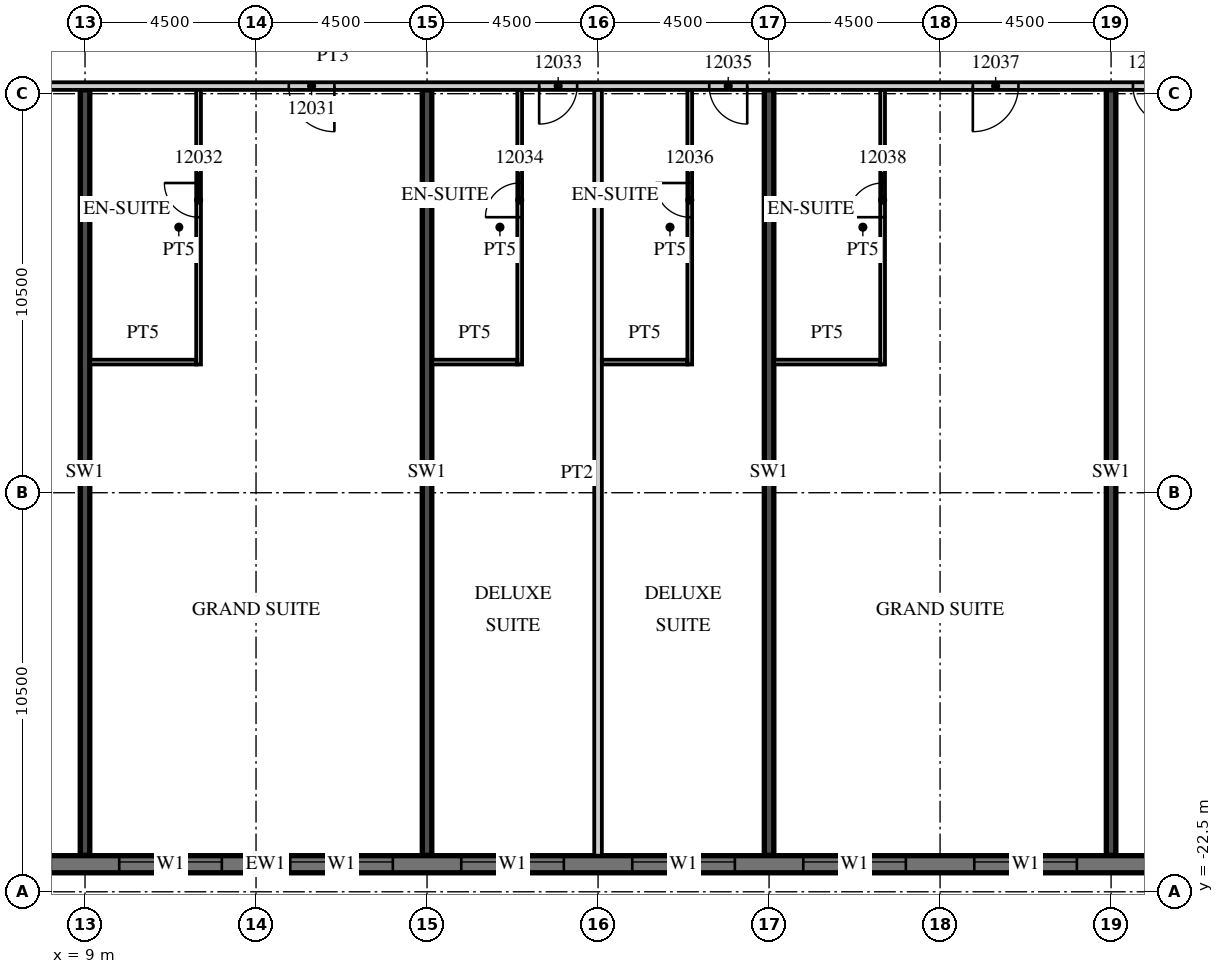
"""IFC4 building model, lengths in metres.
Left out: names, types, materials, properties, quantities, classifications, styles, units other than length and angle.
Written with IfcOpenShell. Run it as: python <this file> out.ifc"""

import sys

from ifc_helpers import new_model, si_unit, direction, frame, frame_2d, origin, place, context, subcontext, project, spatial, rectangle, extrude, element, fill, save


model = new_model("IFC4")
c1 = context("Model", 3, precision=1e-05, world=origin(), true_north=direction((0.0, 1.0)))
c2 = subcontext(c1, "Body", "Model", "MODEL_VIEW")
j1 = project(units=[si_unit("LENGTHUNIT", "METRE"), si_unit("PLANEANGLEUNIT", "RADIAN")], contexts=[c1])
p1 = place(None, origin())
s1 = spatial("IfcSite", under=j1, at=p1, CompositionType="ELEMENT")
p2 = place(p1, origin())
s2 = spatial("IfcBuilding", under=s1, at=p2, CompositionType="ELEMENT")
p3 = place(p2, frame((0.0, 0.0, 69.9)))
s3 = spatial("IfcBuildingStorey", under=s2, at=p3, CompositionType="ELEMENT", Elevation=69.9)
for number, where, z_axis, x_axis in (
    (1, (9.0, -21.54, 0.0), (0.0, 0.0, 1.0), (0.0, 1.0, 0.0)),
    (2, (18.0, -21.54, 0.0), (0.0, 0.0, 1.0), (0.0, 1.0, 0.0)),
    (3, (27.0, -21.54, 0.0), (0.0, 0.0, 1.0), (0.0, 1.0, 0.0)),
    (4, (36.0, -21.54, 0.0), (0.0, 0.0, 1.0), (0.0, 1.0, 0.0)),
):
    element("IfcWall", number, at=place(p3, frame(where, z_axis=z_axis, x_axis=x_axis)), inside=s3, PredefinedType="SHEAR", context=c2, shape_type="SweptSolid", body=[
        extrude(rectangle(XDim=20.14, YDim=0.25, at=frame_2d((10.07, 0.0))), origin(), (0.0, 0.0, 1.0), 3.3),
    ])
p4 = place(p3, frame((-13.5, -21.775, 0.0), z_axis=(0.0, 0.0, 1.0), x_axis=(1.0, 0.0, 0.0)))
e5 = element("IfcWall", 5, at=p4, inside=s3, PredefinedType="SOLIDWALL", context=c2, shape_type="SweptSolid", body=[
    extrude(rectangle(XDim=54.5, YDim=0.45, at=frame_2d((27.25, 0.0))), origin(), (0.0, 0.0, 1.0), 3.02),
])
p5 = place(p4, frame((0.9, 0.0, 0.45)))
e6 = element("IfcOpeningElement", 6, at=p5, cuts=e5, PredefinedType="OPENING", context=c2, shape_type="SweptSolid", body=[
    extrude(rectangle(XDim=2.7, YDim=2.25, at=frame_2d((1.35, 1.125))), frame((0.0, 0.235, 0.0), z_axis=(0.0, -1.0, 0.0), x_axis=(1.0, 0.0, 0.0)), (0.0, 0.0, 1.0), 0.47),
])
p6 = place(p4, frame((5.4, 0.0, 0.45)))
e7 = element("IfcOpeningElement", 7, at=p6, cuts=e5, PredefinedType="OPENING", context=c2, shape_type="SweptSolid", body=[
    extrude(rectangle(XDim=2.7, YDim=2.25, at=frame_2d((1.35, 1.125))), frame((0.0, 0.235, 0.0), z_axis=(0.0, -1.0, 0.0), x_axis=(1.0, 0.0, 0.0)), (0.0, 0.0, 1.0), 0.47),
])
p7 = place(p4, frame((9.9, 0.0, 0.45)))
e8 = element("IfcOpeningElement", 8, at=p7, cuts=e5, PredefinedType="OPENING", context=c2, shape_type="SweptSolid", body=[
    extrude(rectangle(XDim=2.7, YDim=2.25, at=frame_2d((1.35, 1.125))), frame((0.0, 0.235, 0.0), z_axis=(0.0, -1.0, 0.0), x_axis=(1.0, 0.0, 0.0)), (0.0, 0.0, 1.0), 0.47),
])
p8 = place(p4, frame((14.4, 0.0, 0.45)))
e9 = element("IfcOpeningElement", 9, at=p8, cuts=e5, PredefinedType="OPENING", context=c2, shape_type="SweptSolid", body=[
    extrude(rectangle(XDim=2.7, YDim=2.25, at=frame_2d((1.35, 1.125))), frame((0.0, 0.235, 0.0), z_axis=(0.0, -1.0, 0.0), x_axis=(1.0, 0.0, 0.0)), (0.0, 0.0, 1.0), 0.47),
])
p9 = place(p4, frame((18.9, 0.0, 0.45)))
e10 = element("IfcOpeningElement", 10, at=p9, cuts=e5, PredefinedType="OPENING", context=c2, shape_type="SweptSolid", body=[
    extrude(rectangle(XDim=2.7, YDim=2.25, at=frame_2d((1.35, 1.125))), frame((0.0, 0.235, 0.0), z_axis=(0.0, -1.0, 0.0), x_axis=(1.0, 0.0, 0.0)), (0.0, 0.0, 1.0), 0.47),
])
p10 = place(p4, frame((23.4, 0.0, 0.45)))
e11 = element("IfcOpeningElement", 11, at=p10, cuts=e5, PredefinedType="OPENING", context=c2, shape_type="SweptSolid", body=[
    extrude(rectangle(XDim=2.7, YDim=2.25, at=frame_2d((1.35, 1.125))), frame((0.0, 0.235, 0.0), z_axis=(0.0, -1.0, 0.0), x_axis=(1.0, 0.0, 0.0)), (0.0, 0.0, 1.0), 0.47),
])
p11 = place(p4, frame((27.9, 0.0, 0.45)))
e12 = element("IfcOpeningElement", 12, at=p11, cuts=e5, PredefinedType="OPENING", context=c2, shape_type="SweptSolid", body=[
    extrude(rectangle(XDim=2.7, YDim=2.25, at=frame_2d((1.35, 1.125))), frame((0.0, 0.235, 0.0), z_axis=(0.0, -1.0, 0.0), x_axis=(1.0, 0.0, 0.0)), (0.0, 0.0, 1.0), 0.47),
])
p12 = place(p4, frame((32.4, 0.0, 0.45)))
e13 = element("IfcOpeningElement", 13, at=p12, cuts=e5, PredefinedType="OPENING", context=c2, shape_type="SweptSolid", body=[
    extrude(rectangle(XDim=2.7, YDim=2.25, at=frame_2d((1.35, 1.125))), frame((0.0, 0.235, 0.0), z_axis=(0.0, -1.0, 0.0), x_axis=(1.0, 0.0, 0.0)), (0.0, 0.0, 1.0), 0.47),
])
p13 = place(p4, frame((36.9, 0.0, 0.45)))
e14 = element("IfcOpeningElement", 14, at=p13, cuts=e5, PredefinedType="OPENING", context=c2, shape_type="SweptSolid", body=[
    extrude(rectangle(XDim=2.7, YDim=2.25, at=frame_2d((1.35, 1.125))), frame((0.0, 0.235, 0.0), z_axis=(0.0, -1.0, 0.0), x_axis=(1.0, 0.0, 0.0)), (0.0, 0.0, 1.0), 0.47),
])
p14 = place(p4, frame((41.4, 0.0, 0.45)))
e15 = element("IfcOpeningElement", 15, at=p14, cuts=e5, PredefinedType="OPENING", context=c2, shape_type="SweptSolid", body=[
    extrude(rectangle(XDim=2.7, YDim=2.25, at=frame_2d((1.35, 1.125))), frame((0.0, 0.235, 0.0), z_axis=(0.0, -1.0, 0.0), x_axis=(1.0, 0.0, 0.0)), (0.0, 0.0, 1.0), 0.47),
])
p15 = place(p4, frame((45.9, 0.0, 0.45)))
e16 = element("IfcOpeningElement", 16, at=p15, cuts=e5, PredefinedType="OPENING", context=c2, shape_type="SweptSolid", body=[
    extrude(rectangle(XDim=2.7, YDim=2.25, at=frame_2d((1.35, 1.125))), frame((0.0, 0.235, 0.0), z_axis=(0.0, -1.0, 0.0), x_axis=(1.0, 0.0, 0.0)), (0.0, 0.0, 1.0), 0.47),
])
p16 = place(p4, frame((50.4, 0.0, 0.45)))
e17 = element("IfcOpeningElement", 17, at=p16, cuts=e5, PredefinedType="OPENING", context=c2, shape_type="SweptSolid", body=[
    extrude(rectangle(XDim=2.7, YDim=2.25, at=frame_2d((1.35, 1.125))), frame((0.0, 0.235, 0.0), z_axis=(0.0, -1.0, 0.0), x_axis=(1.0, 0.0, 0.0)), (0.0, 0.0, 1.0), 0.47),
])
p17 = place(p3, frame((-13.5, -1.3, 0.0), z_axis=(0.0, 0.0, 1.0), x_axis=(1.0, 0.0, 0.0)))
e18 = element("IfcWall", 18, at=p17, inside=s3, PredefinedType="PARTITIONING", context=c2, shape_type="SweptSolid", body=[
    extrude(rectangle(XDim=58.05, YDim=0.2, at=frame_2d((29.025, 0.0))), origin(), (0.0, 0.0, 1.0), 3.02),
])
p18 = place(p17, frame((2.925, 0.0, 0.0)))
e19 = element("IfcOpeningElement", 19, at=p18, cuts=e18, PredefinedType="OPENING", context=c2, shape_type="SweptSolid", body=[
    extrude(rectangle(XDim=1.0, YDim=2.1, at=frame_2d((0.5, 1.05))), frame((0.0, 0.11, 0.0), z_axis=(0.0, -1.0, 0.0), x_axis=(1.0, 0.0, 0.0)), (0.0, 0.0, 1.0), 0.22),
])
p19 = place(p17, frame((5.075, 0.0, 0.0)))
e20 = element("IfcOpeningElement", 20, at=p19, cuts=e18, PredefinedType="OPENING", context=c2, shape_type="SweptSolid", body=[
    extrude(rectangle(XDim=1.0, YDim=2.1, at=frame_2d((0.5, 1.05))), frame((0.0, 0.11, 0.0), z_axis=(0.0, -1.0, 0.0), x_axis=(1.0, 0.0, 0.0)), (0.0, 0.0, 1.0), 0.22),
])
p20 = place(p17, frame((9.55, 0.0, 0.0)))
e21 = element("IfcOpeningElement", 21, at=p20, cuts=e18, PredefinedType="OPENING", context=c2, shape_type="SweptSolid", body=[
    extrude(rectangle(XDim=1.0, YDim=2.1, at=frame_2d((0.5, 1.05))), frame((0.0, 0.11, 0.0), z_axis=(0.0, -1.0, 0.0), x_axis=(1.0, 0.0, 0.0)), (0.0, 0.0, 1.0), 0.22),
])
p21 = place(p17, frame((18.862, 0.0, 0.0)))
e22 = element("IfcOpeningElement", 22, at=p21, cuts=e18, PredefinedType="OPENING", context=c2, shape_type="SweptSolid", body=[
    extrude(rectangle(XDim=1.2, YDim=2.1, at=frame_2d((0.6, 1.05))), frame((0.0, 0.11, 0.0), z_axis=(0.0, -1.0, 0.0), x_axis=(1.0, 0.0, 0.0)), (0.0, 0.0, 1.0), 0.22),
])
p22 = place(p17, frame((27.862, 0.0, 0.0)))
e23 = element("IfcOpeningElement", 23, at=p22, cuts=e18, PredefinedType="OPENING", context=c2, shape_type="SweptSolid", body=[
    extrude(rectangle(XDim=1.2, YDim=2.1, at=frame_2d((0.6, 1.05))), frame((0.0, 0.11, 0.0), z_axis=(0.0, -1.0, 0.0), x_axis=(1.0, 0.0, 0.0)), (0.0, 0.0, 1.0), 0.22),
])
p23 = place(p17, frame((34.45, 0.0, 0.0)))
e24 = element("IfcOpeningElement", 24, at=p23, cuts=e18, PredefinedType="OPENING", context=c2, shape_type="SweptSolid", body=[
    extrude(rectangle(XDim=1.0, YDim=2.1, at=frame_2d((0.5, 1.05))), frame((0.0, 0.11, 0.0), z_axis=(0.0, -1.0, 0.0), x_axis=(1.0, 0.0, 0.0)), (0.0, 0.0, 1.0), 0.22),
])
p24 = place(p17, frame((38.925, 0.0, 0.0)))
e25 = element("IfcOpeningElement", 25, at=p24, cuts=e18, PredefinedType="OPENING", context=c2, shape_type="SweptSolid", body=[
    extrude(rectangle(XDim=1.0, YDim=2.1, at=frame_2d((0.5, 1.05))), frame((0.0, 0.11, 0.0), z_axis=(0.0, -1.0, 0.0), x_axis=(1.0, 0.0, 0.0)), (0.0, 0.0, 1.0), 0.22),
])
p25 = place(p17, frame((45.862, 0.0, 0.0)))
e26 = element("IfcOpeningElement", 26, at=p25, cuts=e18, PredefinedType="OPENING", context=c2, shape_type="SweptSolid", body=[
    extrude(rectangle(XDim=1.2, YDim=2.1, at=frame_2d((0.6, 1.05))), frame((0.0, 0.11, 0.0), z_axis=(0.0, -1.0, 0.0), x_axis=(1.0, 0.0, 0.0)), (0.0, 0.0, 1.0), 0.22),
])
p26 = place(p17, frame((50.075, 0.0, 0.0)))
e27 = element("IfcOpeningElement", 27, at=p26, cuts=e18, PredefinedType="OPENING", context=c2, shape_type="SweptSolid", body=[
    extrude(rectangle(XDim=1.0, YDim=2.1, at=frame_2d((0.5, 1.05))), frame((0.0, 0.11, 0.0), z_axis=(0.0, -1.0, 0.0), x_axis=(1.0, 0.0, 0.0)), (0.0, 0.0, 1.0), 0.22),
])
p27 = place(p17, frame((56.525, 0.0, 0.0)))
e28 = element("IfcOpeningElement", 28, at=p27, cuts=e18, PredefinedType="OPENING", context=c2, shape_type="SweptSolid", body=[
    extrude(rectangle(XDim=1.0, YDim=2.1, at=frame_2d((0.5, 1.05))), frame((0.0, 0.11, 0.0), z_axis=(0.0, -1.0, 0.0), x_axis=(1.0, 0.0, 0.0)), (0.0, 0.0, 1.0), 0.22),
])
p28 = place(p3, frame((11.988, -8.625, 0.0), z_axis=(0.0, 0.0, 1.0), x_axis=(0.0, 1.0, 0.0)))
e29 = element("IfcWall", 29, at=p28, inside=s3, PredefinedType="PARTITIONING", context=c2, shape_type="SweptSolid", body=[
    extrude(rectangle(XDim=7.225, YDim=0.125, at=frame_2d((3.613, 0.0))), origin(), (0.0, 0.0, 1.0), 3.02),
])
p29 = place(p28, frame((3.875, 0.0, 0.0)))
e30 = element("IfcOpeningElement", 30, at=p29, cuts=e29, PredefinedType="OPENING", context=c2, shape_type="SweptSolid", body=[
    extrude(rectangle(XDim=0.9, YDim=2.1, at=frame_2d((0.45, 1.05))), frame((0.0, 0.073, 0.0), z_axis=(0.0, -1.0, 0.0), x_axis=(1.0, 0.0, 0.0)), (0.0, 0.0, 1.0), 0.145),
])
p30 = place(p3, frame((9.125, -8.562, 0.0), z_axis=(0.0, 0.0, 1.0), x_axis=(1.0, 0.0, 0.0)))
e31 = element("IfcWall", 31, at=p30, inside=s3, PredefinedType="PARTITIONING", context=c2, shape_type="SweptSolid", body=[
    extrude(rectangle(XDim=2.8, YDim=0.125, at=frame_2d((1.4, 0.0))), origin(), (0.0, 0.0, 1.0), 3.02),
])
p31 = place(p3, frame((22.5, -21.55, 0.0), z_axis=(0.0, 0.0, 1.0), x_axis=(0.0, 1.0, 0.0)))
e32 = element("IfcWall", 32, at=p31, inside=s3, PredefinedType="PARTITIONING", context=c2, shape_type="SweptSolid", body=[
    extrude(rectangle(XDim=20.15, YDim=0.2, at=frame_2d((10.075, 0.0))), origin(), (0.0, 0.0, 1.0), 3.02),
])
p32 = place(p3, frame((20.438, -8.625, 0.0), z_axis=(0.0, 0.0, 1.0), x_axis=(0.0, 1.0, 0.0)))
e33 = element("IfcWall", 33, at=p32, inside=s3, PredefinedType="PARTITIONING", context=c2, shape_type="SweptSolid", body=[
    extrude(rectangle(XDim=7.225, YDim=0.125, at=frame_2d((3.613, 0.0))), origin(), (0.0, 0.0, 1.0), 3.02),
])
p33 = place(p32, frame((3.875, 0.0, 0.0)))
e34 = element("IfcOpeningElement", 34, at=p33, cuts=e33, PredefinedType="OPENING", context=c2, shape_type="SweptSolid", body=[
    extrude(rectangle(XDim=0.9, YDim=2.1, at=frame_2d((0.45, 1.05))), frame((0.0, 0.073, 0.0), z_axis=(0.0, -1.0, 0.0), x_axis=(1.0, 0.0, 0.0)), (0.0, 0.0, 1.0), 0.145),
])
p34 = place(p3, frame((18.125, -8.562, 0.0), z_axis=(0.0, 0.0, 1.0), x_axis=(1.0, 0.0, 0.0)))
e35 = element("IfcWall", 35, at=p34, inside=s3, PredefinedType="PARTITIONING", context=c2, shape_type="SweptSolid", body=[
    extrude(rectangle(XDim=2.25, YDim=0.125, at=frame_2d((1.125, 0.0))), origin(), (0.0, 0.0, 1.0), 3.02),
])
p35 = place(p3, frame((24.913, -8.625, 0.0), z_axis=(0.0, 0.0, 1.0), x_axis=(0.0, 1.0, 0.0)))
e36 = element("IfcWall", 36, at=p35, inside=s3, PredefinedType="PARTITIONING", context=c2, shape_type="SweptSolid", body=[
    extrude(rectangle(XDim=7.225, YDim=0.125, at=frame_2d((3.613, 0.0))), origin(), (0.0, 0.0, 1.0), 3.02),
])
p36 = place(p35, frame((3.875, 0.0, 0.0)))
e37 = element("IfcOpeningElement", 37, at=p36, cuts=e36, PredefinedType="OPENING", context=c2, shape_type="SweptSolid", body=[
    extrude(rectangle(XDim=0.9, YDim=2.1, at=frame_2d((0.45, 1.05))), frame((0.0, 0.073, 0.0), z_axis=(0.0, -1.0, 0.0), x_axis=(1.0, 0.0, 0.0)), (0.0, 0.0, 1.0), 0.145),
])
p37 = place(p3, frame((22.6, -8.562, 0.0), z_axis=(0.0, 0.0, 1.0), x_axis=(1.0, 0.0, 0.0)))
e38 = element("IfcWall", 38, at=p37, inside=s3, PredefinedType="PARTITIONING", context=c2, shape_type="SweptSolid", body=[
    extrude(rectangle(XDim=2.25, YDim=0.125, at=frame_2d((1.125, 0.0))), origin(), (0.0, 0.0, 1.0), 3.02),
])
p38 = place(p3, frame((29.988, -8.625, 0.0), z_axis=(0.0, 0.0, 1.0), x_axis=(0.0, 1.0, 0.0)))
e39 = element("IfcWall", 39, at=p38, inside=s3, PredefinedType="PARTITIONING", context=c2, shape_type="SweptSolid", body=[
    extrude(rectangle(XDim=7.225, YDim=0.125, at=frame_2d((3.613, 0.0))), origin(), (0.0, 0.0, 1.0), 3.02),
])
p39 = place(p38, frame((3.875, 0.0, 0.0)))
e40 = element("IfcOpeningElement", 40, at=p39, cuts=e39, PredefinedType="OPENING", context=c2, shape_type="SweptSolid", body=[
    extrude(rectangle(XDim=0.9, YDim=2.1, at=frame_2d((0.45, 1.05))), frame((0.0, 0.073, 0.0), z_axis=(0.0, -1.0, 0.0), x_axis=(1.0, 0.0, 0.0)), (0.0, 0.0, 1.0), 0.145),
])
p40 = place(p3, frame((27.125, -8.562, 0.0), z_axis=(0.0, 0.0, 1.0), x_axis=(1.0, 0.0, 0.0)))
e41 = element("IfcWall", 41, at=p40, inside=s3, PredefinedType="PARTITIONING", context=c2, shape_type="SweptSolid", body=[
    extrude(rectangle(XDim=2.8, YDim=0.125, at=frame_2d((1.4, 0.0))), origin(), (0.0, 0.0, 1.0), 3.02),
])
p41 = place(p10, origin())
e42 = element("IfcWindow", 42, at=p41, inside=s3, PartitioningType="SINGLE_PANEL", PredefinedType="WINDOW", context=c2, shape_type="SweptSolid", body=[
    extrude(rectangle(XDim=2.7, YDim=2.25, at=frame_2d((1.35, 1.125))), frame((0.0, 0.09, 0.0), z_axis=(0.0, -1.0, 0.0), x_axis=(1.0, 0.0, 0.0)), (0.0, 0.0, 1.0), 0.06),
])
fill(e11, e42)
p42 = place(p11, origin())
e43 = element("IfcWindow", 43, at=p42, inside=s3, PartitioningType="SINGLE_PANEL", PredefinedType="WINDOW", context=c2, shape_type="SweptSolid", body=[
    extrude(rectangle(XDim=2.7, YDim=2.25, at=frame_2d((1.35, 1.125))), frame((0.0, 0.09, 0.0), z_axis=(0.0, -1.0, 0.0), x_axis=(1.0, 0.0, 0.0)), (0.0, 0.0, 1.0), 0.06),
])
fill(e12, e43)
p43 = place(p12, origin())
e44 = element("IfcWindow", 44, at=p43, inside=s3, PartitioningType="SINGLE_PANEL", PredefinedType="WINDOW", context=c2, shape_type="SweptSolid", body=[
    extrude(rectangle(XDim=2.7, YDim=2.25, at=frame_2d((1.35, 1.125))), frame((0.0, 0.09, 0.0), z_axis=(0.0, -1.0, 0.0), x_axis=(1.0, 0.0, 0.0)), (0.0, 0.0, 1.0), 0.06),
])
fill(e13, e44)
p44 = place(p13, origin())
e45 = element("IfcWindow", 45, at=p44, inside=s3, PartitioningType="SINGLE_PANEL", PredefinedType="WINDOW", context=c2, shape_type="SweptSolid", body=[
    extrude(rectangle(XDim=2.7, YDim=2.25, at=frame_2d((1.35, 1.125))), frame((0.0, 0.09, 0.0), z_axis=(0.0, -1.0, 0.0), x_axis=(1.0, 0.0, 0.0)), (0.0, 0.0, 1.0), 0.06),
])
fill(e14, e45)
p45 = place(p14, origin())
e46 = element("IfcWindow", 46, at=p45, inside=s3, PartitioningType="SINGLE_PANEL", PredefinedType="WINDOW", context=c2, shape_type="SweptSolid", body=[
    extrude(rectangle(XDim=2.7, YDim=2.25, at=frame_2d((1.35, 1.125))), frame((0.0, 0.09, 0.0), z_axis=(0.0, -1.0, 0.0), x_axis=(1.0, 0.0, 0.0)), (0.0, 0.0, 1.0), 0.06),
])
fill(e15, e46)
p46 = place(p15, origin())
e47 = element("IfcWindow", 47, at=p46, inside=s3, PartitioningType="SINGLE_PANEL", PredefinedType="WINDOW", context=c2, shape_type="SweptSolid", body=[
    extrude(rectangle(XDim=2.7, YDim=2.25, at=frame_2d((1.35, 1.125))), frame((0.0, 0.09, 0.0), z_axis=(0.0, -1.0, 0.0), x_axis=(1.0, 0.0, 0.0)), (0.0, 0.0, 1.0), 0.06),
])
fill(e16, e47)
p47 = place(p22, origin())
e48 = element("IfcDoor", 48, at=p47, inside=s3, OperationType="SINGLE_SWING_RIGHT", PredefinedType="DOOR", context=c2, shape_type="SweptSolid", body=[
    extrude(rectangle(XDim=1.2, YDim=2.1, at=frame_2d((0.6, 1.05))), frame((0.0, 0.025, 0.0), z_axis=(0.0, -1.0, 0.0), x_axis=(1.0, 0.0, 0.0)), (0.0, 0.0, 1.0), 0.05),
])
fill(e23, e48)
p48 = place(p29, origin())
e49 = element("IfcDoor", 49, at=p48, inside=s3, OperationType="SINGLE_SWING_RIGHT", PredefinedType="DOOR", context=c2, shape_type="SweptSolid", body=[
    extrude(rectangle(XDim=0.9, YDim=2.1, at=frame_2d((0.45, 1.05))), frame((0.0, 0.025, 0.0), z_axis=(0.0, -1.0, 0.0), x_axis=(1.0, 0.0, 0.0)), (0.0, 0.0, 1.0), 0.05),
])
fill(e30, e49)
p49 = place(p23, origin())
e50 = element("IfcDoor", 50, at=p49, inside=s3, OperationType="SINGLE_SWING_LEFT", PredefinedType="DOOR", context=c2, shape_type="SweptSolid", body=[
    extrude(rectangle(XDim=1.0, YDim=2.1, at=frame_2d((0.5, 1.05))), frame((0.0, 0.025, 0.0), z_axis=(0.0, -1.0, 0.0), x_axis=(1.0, 0.0, 0.0)), (0.0, 0.0, 1.0), 0.05),
])
fill(e24, e50)
p50 = place(p33, origin())
e51 = element("IfcDoor", 51, at=p50, inside=s3, OperationType="SINGLE_SWING_LEFT", PredefinedType="DOOR", context=c2, shape_type="SweptSolid", body=[
    extrude(rectangle(XDim=0.9, YDim=2.1, at=frame_2d((0.45, 1.05))), frame((0.0, 0.025, 0.0), z_axis=(0.0, -1.0, 0.0), x_axis=(1.0, 0.0, 0.0)), (0.0, 0.0, 1.0), 0.05),
])
fill(e34, e51)
p51 = place(p24, origin())
e52 = element("IfcDoor", 52, at=p51, inside=s3, OperationType="SINGLE_SWING_RIGHT", PredefinedType="DOOR", context=c2, shape_type="SweptSolid", body=[
    extrude(rectangle(XDim=1.0, YDim=2.1, at=frame_2d((0.5, 1.05))), frame((0.0, 0.025, 0.0), z_axis=(0.0, -1.0, 0.0), x_axis=(1.0, 0.0, 0.0)), (0.0, 0.0, 1.0), 0.05),
])
fill(e25, e52)
p52 = place(p36, origin())
e53 = element("IfcDoor", 53, at=p52, inside=s3, OperationType="SINGLE_SWING_RIGHT", PredefinedType="DOOR", context=c2, shape_type="SweptSolid", body=[
    extrude(rectangle(XDim=0.9, YDim=2.1, at=frame_2d((0.45, 1.05))), frame((0.0, 0.025, 0.0), z_axis=(0.0, -1.0, 0.0), x_axis=(1.0, 0.0, 0.0)), (0.0, 0.0, 1.0), 0.05),
])
fill(e37, e53)
p53 = place(p25, origin())
e54 = element("IfcDoor", 54, at=p53, inside=s3, OperationType="SINGLE_SWING_LEFT", PredefinedType="DOOR", context=c2, shape_type="SweptSolid", body=[
    extrude(rectangle(XDim=1.2, YDim=2.1, at=frame_2d((0.6, 1.05))), frame((0.0, 0.025, 0.0), z_axis=(0.0, -1.0, 0.0), x_axis=(1.0, 0.0, 0.0)), (0.0, 0.0, 1.0), 0.05),
])
fill(e26, e54)
p54 = place(p39, origin())
e55 = element("IfcDoor", 55, at=p54, inside=s3, OperationType="SINGLE_SWING_LEFT", PredefinedType="DOOR", context=c2, shape_type="SweptSolid", body=[
    extrude(rectangle(XDim=0.9, YDim=2.1, at=frame_2d((0.45, 1.05))), frame((0.0, 0.025, 0.0), z_axis=(0.0, -1.0, 0.0), x_axis=(1.0, 0.0, 0.0)), (0.0, 0.0, 1.0), 0.05),
])
fill(e40, e55)
p55 = place(p26, origin())
e56 = element("IfcDoor", 56, at=p55, inside=s3, OperationType="SINGLE_SWING_RIGHT", PredefinedType="DOOR", context=c2, shape_type="SweptSolid", body=[
    extrude(rectangle(XDim=1.0, YDim=2.1, at=frame_2d((0.5, 1.05))), frame((0.0, 0.025, 0.0), z_axis=(0.0, -1.0, 0.0), x_axis=(1.0, 0.0, 0.0)), (0.0, 0.0, 1.0), 0.05),
])
fill(e27, e56)
save(model, sys.argv[1])
